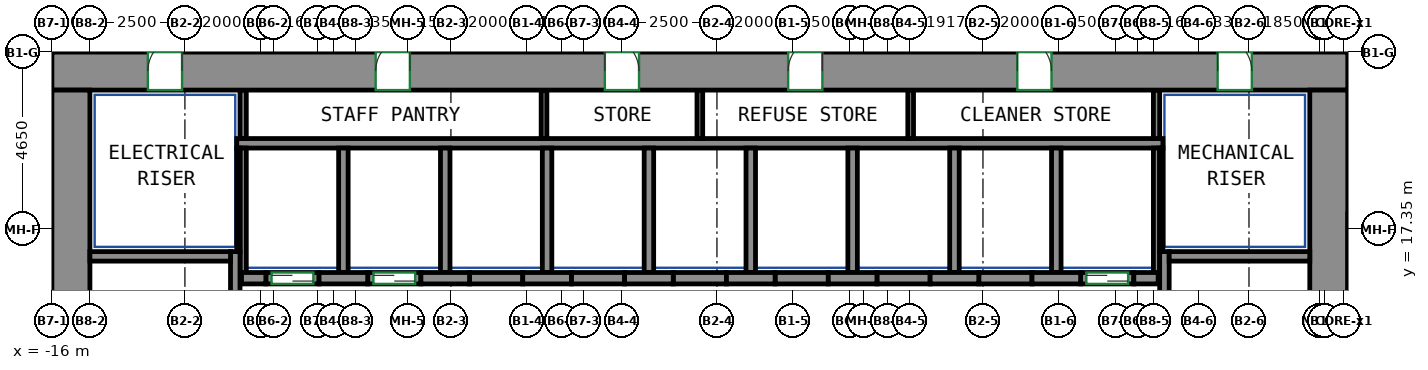
"""IFC4 building model, lengths in metres.
Left out: names, types, materials, properties, quantities, classifications, styles, units other than length and angle.
Written with IfcOpenShell. Run it as: python <this file> out.ifc"""

import sys

from ifc_helpers import new_model, si_unit, direction, frame, frame_2d, origin, place, context, subcontext, project, spatial, rectangle, extrude, source, transform, mapped, element, fill, save


model = new_model("IFC4")
c1 = context("Model", 3, precision=1e-05, world=origin(), true_north=direction((0.0, 1.0)))
c2 = subcontext(c1, "Body", "Model", "MODEL_VIEW")
j1 = project(units=[si_unit("LENGTHUNIT", "METRE"), si_unit("PLANEANGLEUNIT", "RADIAN")], contexts=[c1])
p1 = place(None, origin())
s1 = spatial("IfcSite", under=j1, at=p1, CompositionType="ELEMENT")
p2 = place(p1, origin())
s2 = spatial("IfcBuilding", under=s1, at=p2, CompositionType="ELEMENT")
p3 = place(p2, frame((0.0, 0.0, 91.2)))
s3 = spatial("IfcBuildingStorey", under=s2, at=p3, CompositionType="ELEMENT", Elevation=91.2)
m1 = source(origin(), c2, "Body", "SweptSolid", [
    extrude(rectangle(XDim=34.1, YDim=1.0, at=frame_2d((17.05, 0.0))), origin(), (0.0, 0.0, 1.0), 3.6),
])
p4 = place(p3, frame((-16.0, 21.5, 0.0), z_axis=(0.0, 0.0, 1.0), x_axis=(1.0, 0.0, 0.0)))
e1 = element("IfcWall", 1, at=p4, inside=s3, PredefinedType="SHEAR", context=c2, shape_type="MappedRepresentation", body=[
    mapped(m1, transform((0.0, 0.0, 0.0))),
])
p5 = place(p4, frame((8.52, 0.0, 0.0)))
e2 = element("IfcOpeningElement", 2, at=p5, cuts=e1, PredefinedType="OPENING", context=c2, shape_type="SweptSolid", body=[
    extrude(rectangle(XDim=0.9, YDim=2.1, at=frame_2d((0.45, 1.05))), frame((0.0, 0.51, 0.0), z_axis=(0.0, -1.0, 0.0), x_axis=(1.0, 0.0, 0.0)), (0.0, 0.0, 1.0), 1.02),
])
p6 = place(p4, frame((14.55, 0.0, 0.0)))
e3 = element("IfcOpeningElement", 3, at=p6, cuts=e1, PredefinedType="OPENING", context=c2, shape_type="SweptSolid", body=[
    extrude(rectangle(XDim=0.9, YDim=2.1, at=frame_2d((0.45, 1.05))), frame((0.0, 0.51, 0.0), z_axis=(0.0, -1.0, 0.0), x_axis=(1.0, 0.0, 0.0)), (0.0, 0.0, 1.0), 1.02),
])
p7 = place(p4, frame((19.374, 0.0, 0.0)))
e4 = element("IfcOpeningElement", 4, at=p7, cuts=e1, PredefinedType="OPENING", context=c2, shape_type="SweptSolid", body=[
    extrude(rectangle(XDim=0.9, YDim=2.1, at=frame_2d((0.45, 1.05))), frame((0.0, 0.51, 0.0), z_axis=(0.0, -1.0, 0.0), x_axis=(1.0, 0.0, 0.0)), (0.0, 0.0, 1.0), 1.02),
])
p8 = place(p4, frame((25.404, 0.0, 0.0)))
e5 = element("IfcOpeningElement", 5, at=p8, cuts=e1, PredefinedType="OPENING", context=c2, shape_type="SweptSolid", body=[
    extrude(rectangle(XDim=0.9, YDim=2.1, at=frame_2d((0.45, 1.05))), frame((0.0, 0.51, 0.0), z_axis=(0.0, -1.0, 0.0), x_axis=(1.0, 0.0, 0.0)), (0.0, 0.0, 1.0), 1.02),
])
p9 = place(p4, frame((2.525, 0.0, 0.0)))
e6 = element("IfcOpeningElement", 6, at=p9, cuts=e1, PredefinedType="OPENING", context=c2, shape_type="SweptSolid", body=[
    extrude(rectangle(XDim=0.9, YDim=2.1, at=frame_2d((0.45, 1.05))), frame((0.0, 0.51, 0.0), z_axis=(0.0, -1.0, 0.0), x_axis=(1.0, 0.0, 0.0)), (0.0, 0.0, 1.0), 1.02),
])
p10 = place(p4, frame((30.675, 0.0, 0.0)))
e7 = element("IfcOpeningElement", 7, at=p10, cuts=e1, PredefinedType="OPENING", context=c2, shape_type="SweptSolid", body=[
    extrude(rectangle(XDim=0.9, YDim=2.1, at=frame_2d((0.45, 1.05))), frame((0.0, 0.51, 0.0), z_axis=(0.0, -1.0, 0.0), x_axis=(1.0, 0.0, 0.0)), (0.0, 0.0, 1.0), 1.02),
])
m2 = source(origin(), c2, "Body", "SweptSolid", [
    extrude(rectangle(XDim=12.0, YDim=1.0, at=frame_2d((6.0, 0.0))), origin(), (0.0, 0.0, 1.0), 3.6),
])
for number, where, z_axis, x_axis in (
    (8, (-15.5, 9.0, 0.0), (0.0, 0.0, 1.0), (0.0, 1.0, 0.0)),
    (9, (17.6, 9.0, 0.0), (0.0, 0.0, 1.0), (0.0, 1.0, 0.0)),
):
    element("IfcWall", number, at=place(p3, frame(where, z_axis=z_axis, x_axis=x_axis)), inside=s3, PredefinedType="SHEAR", context=c2, shape_type="MappedRepresentation", body=[
        mapped(m2, transform((0.0, 0.0, 0.0))),
    ])
m3 = source(origin(), c2, "Body", "SweptSolid", [
    extrude(rectangle(XDim=7.75, YDim=0.25, at=frame_2d((3.875, 0.0))), origin(), (0.0, 0.0, 1.0), 3.6),
])
p11 = place(p3, frame((-11.175, 9.0, 0.0), z_axis=(0.0, 0.0, 1.0), x_axis=(0.0, 1.0, 0.0)))
e10 = element("IfcWall", 10, at=p11, inside=s3, PredefinedType="SHEAR", context=c2, shape_type="MappedRepresentation", body=[
    mapped(m3, transform((0.0, 0.0, 0.0))),
])
m4 = source(origin(), c2, "Body", "SweptSolid", [
    extrude(rectangle(XDim=3.7, YDim=0.25, at=frame_2d((1.85, 0.0))), origin(), (0.0, 0.0, 1.0), 3.6),
])
p12 = place(p3, frame((-15.0, 16.625, 0.0), z_axis=(0.0, 0.0, 1.0), x_axis=(1.0, 0.0, 0.0)))
e11 = element("IfcWall", 11, at=p12, inside=s3, PredefinedType="SHEAR", context=c2, shape_type="MappedRepresentation", body=[
    mapped(m4, transform((0.0, 0.0, 0.0))),
])
p13 = place(p3, frame((13.275, 9.0, 0.0), z_axis=(0.0, 0.0, 1.0), x_axis=(0.0, 1.0, 0.0)))
e12 = element("IfcWall", 12, at=p13, inside=s3, PredefinedType="SHEAR", context=c2, shape_type="MappedRepresentation", body=[
    mapped(m3, transform((0.0, 0.0, 0.0))),
])
m5 = source(origin(), c2, "Body", "SweptSolid", [
    extrude(rectangle(XDim=3.7, YDim=0.25, at=frame_2d((1.85, 0.0))), origin(), (0.0, 0.0, 1.0), 3.6),
])
p14 = place(p3, frame((13.4, 16.625, 0.0), z_axis=(0.0, 0.0, 1.0), x_axis=(1.0, 0.0, 0.0)))
e13 = element("IfcWall", 13, at=p14, inside=s3, PredefinedType="SHEAR", context=c2, shape_type="MappedRepresentation", body=[
    mapped(m5, transform((0.0, 0.0, 0.0))),
])
m6 = source(origin(), c2, "Body", "SweptSolid", [
    extrude(rectangle(XDim=0.64, YDim=0.3, at=frame_2d((0.32, 0.0))), origin(), (0.0, 0.0, 1.0), 3.6),
])
p15 = place(p3, frame((-11.01, 16.05, 0.0), z_axis=(0.0, 0.0, 1.0), x_axis=(1.0, 0.0, 0.0)))
e14 = element("IfcWall", 14, at=p15, inside=s3, PredefinedType="SHEAR", context=c2, shape_type="MappedRepresentation", body=[
    mapped(m6, transform((0.0, 0.0, 0.0))),
])
m7 = source(origin(), c2, "Body", "SweptSolid", [
    extrude(rectangle(XDim=1.28, YDim=0.3, at=frame_2d((0.64, 0.0))), origin(), (0.0, 0.0, 1.0), 3.6),
])
for number, where, z_axis, x_axis in (
    (15, (-8.97, 16.05, 0.0), (0.0, 0.0, 1.0), (1.0, 0.0, 0.0)),
    (16, (-6.29, 16.05, 0.0), (0.0, 0.0, 1.0), (1.0, 0.0, 0.0)),
    (17, (-3.61, 16.05, 0.0), (0.0, 0.0, 1.0), (1.0, 0.0, 0.0)),
    (18, (-0.93, 16.05, 0.0), (0.0, 0.0, 1.0), (1.0, 0.0, 0.0)),
    (19, (1.75, 16.05, 0.0), (0.0, 0.0, 1.0), (1.0, 0.0, 0.0)),
    (20, (4.43, 16.05, 0.0), (0.0, 0.0, 1.0), (1.0, 0.0, 0.0)),
):
    element("IfcWall", number, at=place(p3, frame(where, z_axis=z_axis, x_axis=x_axis)), inside=s3, PredefinedType="SHEAR", context=c2, shape_type="MappedRepresentation", body=[
        mapped(m7, transform((0.0, 0.0, 0.0))),
    ])
m8 = source(origin(), c2, "Body", "SweptSolid", [
    extrude(rectangle(XDim=1.28, YDim=0.3, at=frame_2d((0.64, 0.0))), origin(), (0.0, 0.0, 1.0), 3.6),
])
p16 = place(p3, frame((7.11, 16.05, 0.0), z_axis=(0.0, 0.0, 1.0), x_axis=(1.0, 0.0, 0.0)))
e21 = element("IfcWall", 21, at=p16, inside=s3, PredefinedType="SHEAR", context=c2, shape_type="MappedRepresentation", body=[
    mapped(m8, transform((0.0, 0.0, 0.0))),
])
p17 = place(p3, frame((9.79, 16.05, 0.0), z_axis=(0.0, 0.0, 1.0), x_axis=(1.0, 0.0, 0.0)))
e22 = element("IfcWall", 22, at=p17, inside=s3, PredefinedType="SHEAR", context=c2, shape_type="MappedRepresentation", body=[
    mapped(m7, transform((0.0, 0.0, 0.0))),
])
m9 = source(origin(), c2, "Body", "SweptSolid", [
    extrude(rectangle(XDim=0.64, YDim=0.3, at=frame_2d((0.32, 0.0))), origin(), (0.0, 0.0, 1.0), 3.6),
])
p18 = place(p3, frame((12.47, 16.05, 0.0), z_axis=(0.0, 0.0, 1.0), x_axis=(1.0, 0.0, 0.0)))
e23 = element("IfcWall", 23, at=p18, inside=s3, PredefinedType="SHEAR", context=c2, shape_type="MappedRepresentation", body=[
    mapped(m9, transform((0.0, 0.0, 0.0))),
])
m10 = source(origin(), c2, "Body", "SweptSolid", [
    extrude(rectangle(XDim=1.4, YDim=0.3, at=frame_2d((0.7, 0.0))), origin(), (0.0, 0.0, 1.0), 3.6),
])
p19 = place(p3, frame((11.07, 16.05, 0.0), z_axis=(0.0, 0.0, 1.0), x_axis=(1.0, 0.0, 0.0)))
e24 = element("IfcWall", 24, at=p19, inside=s3, PredefinedType="PARTITIONING", context=c2, shape_type="MappedRepresentation", body=[
    mapped(m10, transform((0.0, 0.0, 0.0))),
])
p20 = place(p19, frame((0.15, 0.0, 0.0)))
e25 = element("IfcOpeningElement", 25, at=p20, cuts=e24, PredefinedType="OPENING", context=c2, shape_type="SweptSolid", body=[
    extrude(rectangle(XDim=1.1, YDim=2.1, at=frame_2d((0.55, 1.05))), frame((0.0, 0.16, 0.0), z_axis=(0.0, -1.0, 0.0), x_axis=(1.0, 0.0, 0.0)), (0.0, 0.0, 1.0), 0.32),
])
m11 = source(origin(), c2, "Body", "SweptSolid", [
    extrude(rectangle(XDim=1.4, YDim=0.3, at=frame_2d((0.7, 0.0))), origin(), (0.0, 0.0, 1.0), 3.6),
])
p21 = place(p3, frame((-10.37, 16.05, 0.0), z_axis=(0.0, 0.0, 1.0), x_axis=(1.0, 0.0, 0.0)))
e26 = element("IfcWall", 26, at=p21, inside=s3, PredefinedType="PARTITIONING", context=c2, shape_type="MappedRepresentation", body=[
    mapped(m11, transform((0.0, 0.0, 0.0))),
])
p22 = place(p21, frame((0.15, 0.0, 0.0)))
e27 = element("IfcOpeningElement", 27, at=p22, cuts=e26, PredefinedType="OPENING", context=c2, shape_type="SweptSolid", body=[
    extrude(rectangle(XDim=1.1, YDim=2.1, at=frame_2d((0.55, 1.05))), frame((0.0, 0.16, 0.0), z_axis=(0.0, -1.0, 0.0), x_axis=(1.0, 0.0, 0.0)), (0.0, 0.0, 1.0), 0.32),
])
p23 = place(p3, frame((-7.69, 16.05, 0.0), z_axis=(0.0, 0.0, 1.0), x_axis=(1.0, 0.0, 0.0)))
e28 = element("IfcWall", 28, at=p23, inside=s3, PredefinedType="PARTITIONING", context=c2, shape_type="MappedRepresentation", body=[
    mapped(m10, transform((0.0, 0.0, 0.0))),
])
p24 = place(p23, frame((0.15, 0.0, 0.0)))
e29 = element("IfcOpeningElement", 29, at=p24, cuts=e28, PredefinedType="OPENING", context=c2, shape_type="SweptSolid", body=[
    extrude(rectangle(XDim=1.1, YDim=2.1, at=frame_2d((0.55, 1.05))), frame((0.0, 0.16, 0.0), z_axis=(0.0, -1.0, 0.0), x_axis=(1.0, 0.0, 0.0)), (0.0, 0.0, 1.0), 0.32),
])
p25 = place(p3, frame((-5.01, 16.05, 0.0), z_axis=(0.0, 0.0, 1.0), x_axis=(1.0, 0.0, 0.0)))
e30 = element("IfcWall", 30, at=p25, inside=s3, PredefinedType="PARTITIONING", context=c2, shape_type="MappedRepresentation", body=[
    mapped(m10, transform((0.0, 0.0, 0.0))),
])
p26 = place(p3, frame((-2.33, 16.05, 0.0), z_axis=(0.0, 0.0, 1.0), x_axis=(1.0, 0.0, 0.0)))
e31 = element("IfcWall", 31, at=p26, inside=s3, PredefinedType="PARTITIONING", context=c2, shape_type="MappedRepresentation", body=[
    mapped(m11, transform((0.0, 0.0, 0.0))),
])
for number, where, z_axis, x_axis in (
    (32, (0.35, 16.05, 0.0), (0.0, 0.0, 1.0), (1.0, 0.0, 0.0)),
    (33, (3.03, 16.05, 0.0), (0.0, 0.0, 1.0), (1.0, 0.0, 0.0)),
):
    element("IfcWall", number, at=place(p3, frame(where, z_axis=z_axis, x_axis=x_axis)), inside=s3, PredefinedType="PARTITIONING", context=c2, shape_type="MappedRepresentation", body=[
        mapped(m10, transform((0.0, 0.0, 0.0))),
    ])
for number, where, z_axis, x_axis in (
    (34, (5.71, 16.05, 0.0), (0.0, 0.0, 1.0), (1.0, 0.0, 0.0)),
    (35, (8.39, 16.05, 0.0), (0.0, 0.0, 1.0), (1.0, 0.0, 0.0)),
):
    element("IfcWall", number, at=place(p3, frame(where, z_axis=z_axis, x_axis=x_axis)), inside=s3, PredefinedType="PARTITIONING", context=c2, shape_type="MappedRepresentation", body=[
        mapped(m11, transform((0.0, 0.0, 0.0))),
    ])
m12 = source(origin(), c2, "Body", "SweptSolid", [
    extrude(rectangle(XDim=24.37, YDim=0.25, at=frame_2d((12.185, 0.0))), origin(), (0.0, 0.0, 1.0), 3.6),
])
p27 = place(p3, frame((-11.135, 19.6, 0.0), z_axis=(0.0, 0.0, 1.0), x_axis=(1.0, 0.0, 0.0)))
e36 = element("IfcWall", 36, at=p27, inside=s3, PredefinedType="PARTITIONING", context=c2, shape_type="MappedRepresentation", body=[
    mapped(m12, transform((0.0, 0.0, 0.0))),
])
m13 = source(origin(), c2, "Body", "SweptSolid", [
    extrude(rectangle(XDim=3.275, YDim=0.165, at=frame_2d((1.638, 0.0))), origin(), (0.0, 0.0, 1.0), 3.6),
])
p28 = place(p3, frame((13.067, 16.2, 0.0), z_axis=(0.0, 0.0, 1.0), x_axis=(0.0, 1.0, 0.0)))
e37 = element("IfcWall", 37, at=p28, inside=s3, PredefinedType="PARTITIONING", context=c2, shape_type="MappedRepresentation", body=[
    mapped(m13, transform((0.0, 0.0, 0.0))),
])
m14 = source(origin(), c2, "Body", "SweptSolid", [
    extrude(rectangle(XDim=1.275, YDim=0.165, at=frame_2d((0.637, 0.0))), origin(), (0.0, 0.0, 1.0), 3.6),
])
p29 = place(p3, frame((13.067, 19.725, 0.0), z_axis=(0.0, 0.0, 1.0), x_axis=(0.0, 1.0, 0.0)))
e38 = element("IfcWall", 38, at=p29, inside=s3, PredefinedType="PARTITIONING", context=c2, shape_type="MappedRepresentation", body=[
    mapped(m14, transform((0.0, 0.0, 0.0))),
])
p30 = place(p3, frame((-10.968, 16.2, 0.0), z_axis=(0.0, 0.0, 1.0), x_axis=(0.0, 1.0, 0.0)))
e39 = element("IfcWall", 39, at=p30, inside=s3, PredefinedType="PARTITIONING", context=c2, shape_type="MappedRepresentation", body=[
    mapped(m13, transform((0.0, 0.0, 0.0))),
])
p31 = place(p3, frame((-10.968, 19.725, 0.0), z_axis=(0.0, 0.0, 1.0), x_axis=(0.0, 1.0, 0.0)))
e40 = element("IfcWall", 40, at=p31, inside=s3, PredefinedType="PARTITIONING", context=c2, shape_type="MappedRepresentation", body=[
    mapped(m14, transform((0.0, 0.0, 0.0))),
])
m15 = source(origin(), c2, "Body", "SweptSolid", [
    extrude(rectangle(XDim=3.275, YDim=0.25, at=frame_2d((1.638, 0.0))), origin(), (0.0, 0.0, 1.0), 3.6),
])
p32 = place(p3, frame((10.43, 16.2, 0.0), z_axis=(0.0, 0.0, 1.0), x_axis=(0.0, 1.0, 0.0)))
e41 = element("IfcWall", 41, at=p32, inside=s3, PredefinedType="PARTITIONING", context=c2, shape_type="MappedRepresentation", body=[
    mapped(m15, transform((0.0, 0.0, 0.0))),
])
m16 = source(origin(), c2, "Body", "SweptSolid", [
    extrude(rectangle(XDim=2.725, YDim=0.085, at=frame_2d((1.363, 0.0))), origin(), (0.0, 0.0, 1.0), 3.6),
])
p33 = place(p3, frame((13.192, 16.75, 0.0), z_axis=(0.0, 0.0, 1.0), x_axis=(0.0, 1.0, 0.0)))
e42 = element("IfcWall", 42, at=p33, inside=s3, PredefinedType="PARTITIONING", context=c2, shape_type="MappedRepresentation", body=[
    mapped(m16, transform((0.0, 0.0, 0.0))),
])
for number, where, z_axis, x_axis in (
    (43, (2.39, 16.2, 0.0), (0.0, 0.0, 1.0), (0.0, 1.0, 0.0)),
    (44, (5.07, 16.2, 0.0), (0.0, 0.0, 1.0), (0.0, 1.0, 0.0)),
    (45, (7.75, 16.2, 0.0), (0.0, 0.0, 1.0), (0.0, 1.0, 0.0)),
    (46, (-0.29, 16.2, 0.0), (0.0, 0.0, 1.0), (0.0, 1.0, 0.0)),
):
    element("IfcWall", number, at=place(p3, frame(where, z_axis=z_axis, x_axis=x_axis)), inside=s3, PredefinedType="PARTITIONING", context=c2, shape_type="MappedRepresentation", body=[
        mapped(m15, transform((0.0, 0.0, 0.0))),
    ])
p34 = place(p3, frame((-11.093, 16.75, 0.0), z_axis=(0.0, 0.0, 1.0), x_axis=(0.0, 1.0, 0.0)))
e47 = element("IfcWall", 47, at=p34, inside=s3, PredefinedType="PARTITIONING", context=c2, shape_type="MappedRepresentation", body=[
    mapped(m16, transform((0.0, 0.0, 0.0))),
])
for number, where, z_axis, x_axis in (
    (48, (-2.97, 16.2, 0.0), (0.0, 0.0, 1.0), (0.0, 1.0, 0.0)),
    (49, (-5.65, 16.2, 0.0), (0.0, 0.0, 1.0), (0.0, 1.0, 0.0)),
    (50, (-8.33, 16.2, 0.0), (0.0, 0.0, 1.0), (0.0, 1.0, 0.0)),
):
    element("IfcWall", number, at=place(p3, frame(where, z_axis=z_axis, x_axis=x_axis)), inside=s3, PredefinedType="PARTITIONING", context=c2, shape_type="MappedRepresentation", body=[
        mapped(m15, transform((0.0, 0.0, 0.0))),
    ])
m17 = source(origin(), c2, "Body", "SweptSolid", [
    extrude(rectangle(XDim=1.275, YDim=0.15, at=frame_2d((0.637, 0.0))), origin(), (0.0, 0.0, 1.0), 3.6),
])
for number, where, z_axis, x_axis in (
    (51, (-3.05, 19.725, 0.0), (0.0, 0.0, 1.0), (0.0, 1.0, 0.0)),
    (52, (1.05, 19.725, 0.0), (0.0, 0.0, 1.0), (0.0, 1.0, 0.0)),
    (53, (6.598, 19.725, 0.0), (0.0, 0.0, 1.0), (0.0, 1.0, 0.0)),
):
    element("IfcWall", number, at=place(p3, frame(where, z_axis=z_axis, x_axis=x_axis)), inside=s3, PredefinedType="PARTITIONING", context=c2, shape_type="MappedRepresentation", body=[
        mapped(m17, transform((0.0, 0.0, 0.0))),
    ])
p35 = place(p20, origin())
e54 = element("IfcDoor", 54, at=p35, inside=s3, OperationType="DOUBLE_DOOR_SLIDING", PredefinedType="DOOR", context=c2, shape_type="SweptSolid", body=[
    extrude(rectangle(XDim=1.1, YDim=2.1, at=frame_2d((0.55, 1.05))), frame((0.0, 0.025, 0.0), z_axis=(0.0, -1.0, 0.0), x_axis=(1.0, 0.0, 0.0)), (0.0, 0.0, 1.0), 0.05),
])
fill(e25, e54)
p36 = place(p22, origin())
e55 = element("IfcDoor", 55, at=p36, inside=s3, OperationType="DOUBLE_DOOR_SLIDING", PredefinedType="DOOR", context=c2, shape_type="SweptSolid", body=[
    extrude(rectangle(XDim=1.1, YDim=2.1, at=frame_2d((0.55, 1.05))), frame((0.0, 0.025, 0.0), z_axis=(0.0, -1.0, 0.0), x_axis=(1.0, 0.0, 0.0)), (0.0, 0.0, 1.0), 0.05),
])
fill(e27, e55)
p37 = place(p24, origin())
e56 = element("IfcDoor", 56, at=p37, inside=s3, OperationType="DOUBLE_DOOR_SLIDING", PredefinedType="DOOR", context=c2, shape_type="SweptSolid", body=[
    extrude(rectangle(XDim=1.1, YDim=2.1, at=frame_2d((0.55, 1.05))), frame((0.0, 0.025, 0.0), z_axis=(0.0, -1.0, 0.0), x_axis=(1.0, 0.0, 0.0)), (0.0, 0.0, 1.0), 0.05),
])
fill(e29, e56)
p38 = place(p5, origin())
e57 = element("IfcDoor", 57, at=p38, inside=s3, OperationType="SINGLE_SWING_RIGHT", PredefinedType="DOOR", context=c2, shape_type="SweptSolid", body=[
    extrude(rectangle(XDim=0.9, YDim=2.1, at=frame_2d((0.45, 1.05))), frame((0.0, -0.355, 0.0), z_axis=(0.0, -1.0, 0.0), x_axis=(1.0, 0.0, 0.0)), (0.0, 0.0, 1.0), 0.05),
])
fill(e2, e57)
p39 = place(p6, origin())
e58 = element("IfcDoor", 58, at=p39, inside=s3, OperationType="SINGLE_SWING_LEFT", PredefinedType="DOOR", context=c2, shape_type="SweptSolid", body=[
    extrude(rectangle(XDim=0.9, YDim=2.1, at=frame_2d((0.45, 1.05))), frame((0.0, -0.355, 0.0), z_axis=(0.0, -1.0, 0.0), x_axis=(1.0, 0.0, 0.0)), (0.0, 0.0, 1.0), 0.05),
])
fill(e3, e58)
p40 = place(p7, origin())
e59 = element("IfcDoor", 59, at=p40, inside=s3, OperationType="SINGLE_SWING_RIGHT", PredefinedType="DOOR", context=c2, shape_type="SweptSolid", body=[
    extrude(rectangle(XDim=0.9, YDim=2.1, at=frame_2d((0.45, 1.05))), frame((0.0, -0.355, 0.0), z_axis=(0.0, -1.0, 0.0), x_axis=(1.0, 0.0, 0.0)), (0.0, 0.0, 1.0), 0.05),
])
fill(e4, e59)
p41 = place(p8, origin())
e60 = element("IfcDoor", 60, at=p41, inside=s3, OperationType="SINGLE_SWING_LEFT", PredefinedType="DOOR", context=c2, shape_type="SweptSolid", body=[
    extrude(rectangle(XDim=0.9, YDim=2.1, at=frame_2d((0.45, 1.05))), frame((0.0, -0.355, 0.0), z_axis=(0.0, -1.0, 0.0), x_axis=(1.0, 0.0, 0.0)), (0.0, 0.0, 1.0), 0.05),
])
fill(e5, e60)
p42 = place(p9, origin())
e61 = element("IfcDoor", 61, at=p42, inside=s3, OperationType="SINGLE_SWING_RIGHT", PredefinedType="DOOR", context=c2, shape_type="SweptSolid", body=[
    extrude(rectangle(XDim=0.9, YDim=2.1, at=frame_2d((0.45, 1.05))), frame((0.0, -0.355, 0.0), z_axis=(0.0, -1.0, 0.0), x_axis=(1.0, 0.0, 0.0)), (0.0, 0.0, 1.0), 0.05),
])
fill(e6, e61)
p43 = place(p10, origin())
e62 = element("IfcDoor", 62, at=p43, inside=s3, OperationType="SINGLE_SWING_LEFT", PredefinedType="DOOR", context=c2, shape_type="SweptSolid", body=[
    extrude(rectangle(XDim=0.9, YDim=2.1, at=frame_2d((0.45, 1.05))), frame((0.0, -0.355, 0.0), z_axis=(0.0, -1.0, 0.0), x_axis=(1.0, 0.0, 0.0)), (0.0, 0.0, 1.0), 0.05),
])
fill(e7, e62)
save(model, sys.argv[1])
